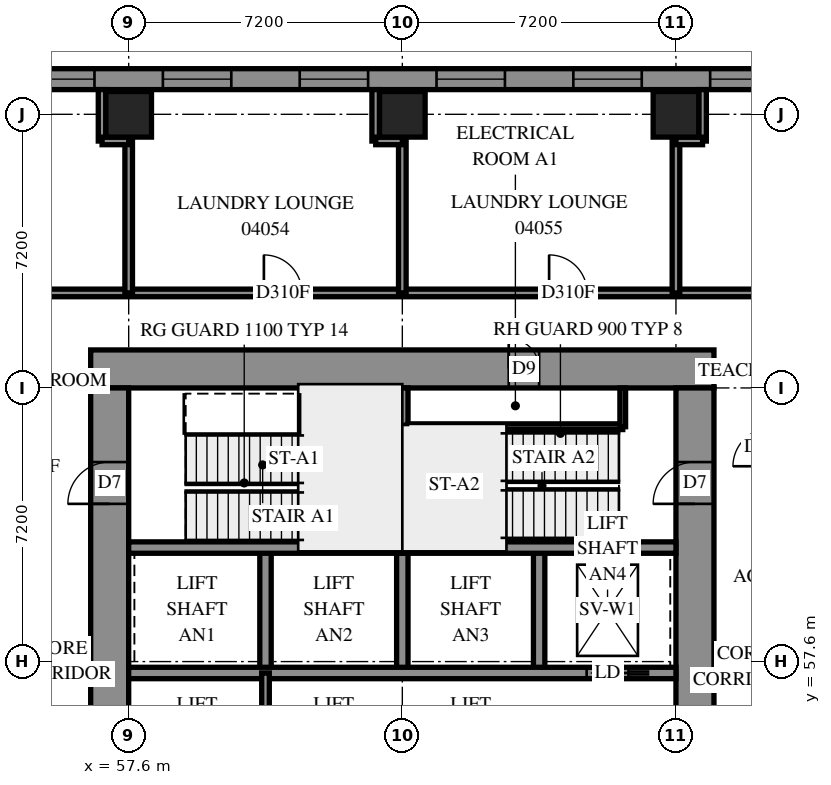
"""IFC4 building model, lengths in metres.
Left out: names, types, materials, properties, quantities, classifications, styles, units other than length and angle.
Written with IfcOpenShell. Run it as: python <this file> out.ifc"""

import sys

from ifc_helpers import new_model, si_unit, direction, frame, frame_2d, origin, origin_2d, place, context, subcontext, project, spatial, polyline, rectangle, outline, extrude, element, fill, save


model = new_model("IFC4")
c1 = context("Model", 3, precision=1e-05, world=origin(), true_north=direction((0.0, 1.0)))
c2 = subcontext(c1, "Body", "Model", "MODEL_VIEW")
j1 = project(units=[si_unit("LENGTHUNIT", "METRE"), si_unit("PLANEANGLEUNIT", "RADIAN")], contexts=[c1])
p1 = place(None, origin())
s1 = spatial("IfcSite", under=j1, at=p1, CompositionType="ELEMENT")
p2 = place(p1, origin())
s2 = spatial("IfcBuilding", under=s1, at=p2, CompositionType="ELEMENT")
p3 = place(p2, frame((0.0, 0.0, 18.6)))
s3 = spatial("IfcBuildingStorey", under=s2, at=p3, CompositionType="ELEMENT", Elevation=18.6)
for number, where, z_axis, x_axis in (
    (1, (57.6, 72.0, 0.0), (0.0, 0.0, 1.0), (1.0, 0.0, 0.0)),
    (2, (64.8, 72.0, 0.0), (0.0, 0.0, 1.0), (1.0, 0.0, 0.0)),
    (3, (72.0, 72.0, 0.0), (0.0, 0.0, 1.0), (1.0, 0.0, 0.0)),
):
    element("IfcColumn", number, at=place(p3, frame(where, z_axis=z_axis, x_axis=x_axis)), inside=s3, PredefinedType="COLUMN", context=c2, shape_type="SweptSolid", body=[
        extrude(rectangle(XDim=1.2, YDim=1.2, at=origin_2d()), origin(), (0.0, 0.0, 1.0), 3.8),
    ])
p4 = place(p3, frame((56.6, 65.3, -0.4), z_axis=(0.0, 0.0, 1.0), x_axis=(1.0, 0.0, 0.0)))
e4 = element("IfcWall", 4, at=p4, inside=s3, PredefinedType="SHEAR", context=c2, shape_type="SweptSolid", body=[
    extrude(rectangle(XDim=16.4, YDim=1.0, at=frame_2d((8.2, 0.0))), origin(), (0.0, 0.0, 1.0), 3.5),
])
p5 = place(p4, frame((11.0, 0.0, 0.4)))
e5 = element("IfcOpeningElement", 5, at=p5, cuts=e4, PredefinedType="OPENING", context=c2, shape_type="SweptSolid", body=[
    extrude(rectangle(XDim=0.8, YDim=2.1, at=frame_2d((0.4, 1.05))), frame((0.0, 0.51, 0.0), z_axis=(0.0, -1.0, 0.0), x_axis=(1.0, 0.0, 0.0)), (0.0, 0.0, 1.0), 1.02),
])
p6 = place(p3, frame((57.1, 50.4, -0.4), z_axis=(0.0, 0.0, 1.0), x_axis=(0.0, 1.0, 0.0)))
e6 = element("IfcWall", 6, at=p6, inside=s3, PredefinedType="SHEAR", context=c2, shape_type="SweptSolid", body=[
    extrude(rectangle(XDim=14.4, YDim=1.0, at=frame_2d((7.2, 0.0))), origin(), (0.0, 0.0, 1.0), 3.5),
])
p7 = place(p6, frame((4.55, 0.0, 0.4)))
e7 = element("IfcOpeningElement", 7, at=p7, cuts=e6, PredefinedType="OPENING", context=c2, shape_type="SweptSolid", body=[
    extrude(rectangle(XDim=1.1, YDim=2.1, at=frame_2d((0.55, 1.05))), frame((0.0, 0.51, 0.0), z_axis=(0.0, -1.0, 0.0), x_axis=(1.0, 0.0, 0.0)), (0.0, 0.0, 1.0), 1.02),
])
p8 = place(p6, frame((11.35, 0.0, 0.4)))
e8 = element("IfcOpeningElement", 8, at=p8, cuts=e6, PredefinedType="OPENING", context=c2, shape_type="SweptSolid", body=[
    extrude(rectangle(XDim=1.1, YDim=2.1, at=frame_2d((0.55, 1.05))), frame((0.0, 0.51, 0.0), z_axis=(0.0, -1.0, 0.0), x_axis=(1.0, 0.0, 0.0)), (0.0, 0.0, 1.0), 1.02),
])
p9 = place(p3, frame((72.5, 50.4, -0.4), z_axis=(0.0, 0.0, 1.0), x_axis=(0.0, 1.0, 0.0)))
e9 = element("IfcWall", 9, at=p9, inside=s3, PredefinedType="SHEAR", context=c2, shape_type="SweptSolid", body=[
    extrude(rectangle(XDim=14.4, YDim=1.0, at=frame_2d((7.2, 0.0))), origin(), (0.0, 0.0, 1.0), 3.5),
])
p10 = place(p9, frame((4.55, 0.0, 0.4)))
e10 = element("IfcOpeningElement", 10, at=p10, cuts=e9, PredefinedType="OPENING", context=c2, shape_type="SweptSolid", body=[
    extrude(rectangle(XDim=1.1, YDim=2.1, at=frame_2d((0.55, 1.05))), frame((0.0, 0.51, 0.0), z_axis=(0.0, -1.0, 0.0), x_axis=(1.0, 0.0, 0.0)), (0.0, 0.0, 1.0), 1.02),
])
p11 = place(p9, frame((11.35, 0.0, 0.4)))
e11 = element("IfcOpeningElement", 11, at=p11, cuts=e9, PredefinedType="OPENING", context=c2, shape_type="SweptSolid", body=[
    extrude(rectangle(XDim=1.1, YDim=2.1, at=frame_2d((0.55, 1.05))), frame((0.0, 0.51, 0.0), z_axis=(0.0, -1.0, 0.0), x_axis=(1.0, 0.0, 0.0)), (0.0, 0.0, 1.0), 1.02),
])
for number, where, z_axis, x_axis in (
    (12, (61.2, 57.3, 0.0), (0.0, 0.0, 1.0), (0.0, 1.0, 0.0)),
    (13, (64.8, 57.3, 0.0), (0.0, 0.0, 1.0), (0.0, 1.0, 0.0)),
    (14, (68.4, 57.3, 0.0), (0.0, 0.0, 1.0), (0.0, 1.0, 0.0)),
):
    element("IfcWall", number, at=place(p3, frame(where, z_axis=z_axis, x_axis=x_axis)), inside=s3, PredefinedType="SOLIDWALL", context=c2, shape_type="SweptSolid", body=[
        extrude(rectangle(XDim=3.3, YDim=0.3, at=frame_2d((1.65, 0.0))), origin(), (0.0, 0.0, 1.0), 3.8),
    ])
p12 = place(p3, frame((57.6, 57.3, 0.0), z_axis=(0.0, 0.0, 1.0), x_axis=(1.0, 0.0, 0.0)))
e15 = element("IfcWall", 15, at=p12, inside=s3, PredefinedType="SOLIDWALL", context=c2, shape_type="SweptSolid", body=[
    extrude(rectangle(XDim=14.4, YDim=0.3, at=frame_2d((7.2, 0.0))), origin(), (0.0, 0.0, 1.0), 3.8),
])
p13 = place(p12, frame((12.05, 0.0, 0.0)))
e16 = element("IfcOpeningElement", 16, at=p13, cuts=e15, PredefinedType="OPENING", context=c2, shape_type="SweptSolid", body=[
    extrude(rectangle(XDim=1.1, YDim=2.1, at=frame_2d((0.55, 1.05))), frame((0.0, 0.16, 0.0), z_axis=(0.0, -1.0, 0.0), x_axis=(1.0, 0.0, 0.0)), (0.0, 0.0, 1.0), 0.32),
])
for number, where, z_axis, x_axis in (
    (17, (57.6, 60.6, 0.0), (0.0, 0.0, 1.0), (1.0, 0.0, 0.0)),
    (18, (64.8, 60.6, 0.0), (0.0, 0.0, 1.0), (1.0, 0.0, 0.0)),
):
    element("IfcWall", number, at=place(p3, frame(where, z_axis=z_axis, x_axis=x_axis)), inside=s3, PredefinedType="SOLIDWALL", context=c2, shape_type="SweptSolid", body=[
        extrude(rectangle(XDim=7.2, YDim=0.3, at=frame_2d((3.6, 0.0))), origin(), (0.0, 0.0, 1.0), 3.8),
    ])
p14 = place(p3, frame((64.8, 60.6, 0.0), z_axis=(0.0, 0.0, 1.0), x_axis=(0.0, 1.0, 0.0)))
e19 = element("IfcWall", 19, at=p14, inside=s3, PredefinedType="SOLIDWALL", context=c2, shape_type="SweptSolid", body=[
    extrude(rectangle(XDim=4.2, YDim=0.3, at=frame_2d((2.1, 0.0))), origin(), (0.0, 0.0, 1.0), 3.8),
])
p15 = place(p3, frame((79.583, 72.925, 0.0), z_axis=(0.0, 0.0, 1.0), x_axis=(-1.0, 0.0, 0.0)))
e20 = element("IfcWall", 20, at=p15, inside=s3, PredefinedType="SOLIDWALL", context=c2, shape_type="SweptSolid", body=[
    extrude(outline(polyline([(-0.114, -0.275), (79.583, -0.275), (79.033, 0.275), (0.114, 0.275), (-0.114, -0.275)])), origin(), (0.0, 0.0, 1.0), 3.8),
])
p16 = place(p15, frame((1.249, 0.0, 0.7)))
e21 = element("IfcOpeningElement", 21, at=p16, cuts=e20, PredefinedType="OPENING", context=c2, shape_type="SweptSolid", body=[
    extrude(rectangle(XDim=1.8, YDim=2.4, at=frame_2d((0.9, 1.2))), frame((0.0, 0.285, 0.0), z_axis=(0.0, -1.0, 0.0), x_axis=(1.0, 0.0, 0.0)), (0.0, 0.0, 1.0), 0.57),
])
p17 = place(p15, frame((4.883, 0.0, 0.7)))
e22 = element("IfcOpeningElement", 22, at=p17, cuts=e20, PredefinedType="OPENING", context=c2, shape_type="SweptSolid", body=[
    extrude(rectangle(XDim=1.8, YDim=2.4, at=frame_2d((0.9, 1.2))), frame((0.0, 0.285, 0.0), z_axis=(0.0, -1.0, 0.0), x_axis=(1.0, 0.0, 0.0)), (0.0, 0.0, 1.0), 0.57),
])
p18 = place(p15, frame((8.483, 0.0, 0.7)))
e23 = element("IfcOpeningElement", 23, at=p18, cuts=e20, PredefinedType="OPENING", context=c2, shape_type="SweptSolid", body=[
    extrude(rectangle(XDim=1.8, YDim=2.4, at=frame_2d((0.9, 1.2))), frame((0.0, 0.285, 0.0), z_axis=(0.0, -1.0, 0.0), x_axis=(1.0, 0.0, 0.0)), (0.0, 0.0, 1.0), 0.57),
])
p19 = place(p15, frame((12.083, 0.0, 0.7)))
e24 = element("IfcOpeningElement", 24, at=p19, cuts=e20, PredefinedType="OPENING", context=c2, shape_type="SweptSolid", body=[
    extrude(rectangle(XDim=1.8, YDim=2.4, at=frame_2d((0.9, 1.2))), frame((0.0, 0.285, 0.0), z_axis=(0.0, -1.0, 0.0), x_axis=(1.0, 0.0, 0.0)), (0.0, 0.0, 1.0), 0.57),
])
p20 = place(p15, frame((15.683, 0.0, 0.7)))
e25 = element("IfcOpeningElement", 25, at=p20, cuts=e20, PredefinedType="OPENING", context=c2, shape_type="SweptSolid", body=[
    extrude(rectangle(XDim=1.8, YDim=2.4, at=frame_2d((0.9, 1.2))), frame((0.0, 0.285, 0.0), z_axis=(0.0, -1.0, 0.0), x_axis=(1.0, 0.0, 0.0)), (0.0, 0.0, 1.0), 0.57),
])
p21 = place(p15, frame((19.283, 0.0, 0.7)))
e26 = element("IfcOpeningElement", 26, at=p21, cuts=e20, PredefinedType="OPENING", context=c2, shape_type="SweptSolid", body=[
    extrude(rectangle(XDim=1.8, YDim=2.4, at=frame_2d((0.9, 1.2))), frame((0.0, 0.285, 0.0), z_axis=(0.0, -1.0, 0.0), x_axis=(1.0, 0.0, 0.0)), (0.0, 0.0, 1.0), 0.57),
])
p22 = place(p15, frame((22.883, 0.0, 0.7)))
e27 = element("IfcOpeningElement", 27, at=p22, cuts=e20, PredefinedType="OPENING", context=c2, shape_type="SweptSolid", body=[
    extrude(rectangle(XDim=1.8, YDim=2.4, at=frame_2d((0.9, 1.2))), frame((0.0, 0.285, 0.0), z_axis=(0.0, -1.0, 0.0), x_axis=(1.0, 0.0, 0.0)), (0.0, 0.0, 1.0), 0.57),
])
p23 = place(p15, frame((26.483, 0.0, 0.7)))
e28 = element("IfcOpeningElement", 28, at=p23, cuts=e20, PredefinedType="OPENING", context=c2, shape_type="SweptSolid", body=[
    extrude(rectangle(XDim=1.8, YDim=2.4, at=frame_2d((0.9, 1.2))), frame((0.0, 0.285, 0.0), z_axis=(0.0, -1.0, 0.0), x_axis=(1.0, 0.0, 0.0)), (0.0, 0.0, 1.0), 0.57),
])
p24 = place(p15, frame((30.083, 0.0, 0.7)))
e29 = element("IfcOpeningElement", 29, at=p24, cuts=e20, PredefinedType="OPENING", context=c2, shape_type="SweptSolid", body=[
    extrude(rectangle(XDim=1.8, YDim=2.4, at=frame_2d((0.9, 1.2))), frame((0.0, 0.285, 0.0), z_axis=(0.0, -1.0, 0.0), x_axis=(1.0, 0.0, 0.0)), (0.0, 0.0, 1.0), 0.57),
])
p25 = place(p15, frame((33.683, 0.0, 0.7)))
e30 = element("IfcOpeningElement", 30, at=p25, cuts=e20, PredefinedType="OPENING", context=c2, shape_type="SweptSolid", body=[
    extrude(rectangle(XDim=1.8, YDim=2.4, at=frame_2d((0.9, 1.2))), frame((0.0, 0.285, 0.0), z_axis=(0.0, -1.0, 0.0), x_axis=(1.0, 0.0, 0.0)), (0.0, 0.0, 1.0), 0.57),
])
p26 = place(p15, frame((37.283, 0.0, 0.7)))
e31 = element("IfcOpeningElement", 31, at=p26, cuts=e20, PredefinedType="OPENING", context=c2, shape_type="SweptSolid", body=[
    extrude(rectangle(XDim=1.8, YDim=2.4, at=frame_2d((0.9, 1.2))), frame((0.0, 0.285, 0.0), z_axis=(0.0, -1.0, 0.0), x_axis=(1.0, 0.0, 0.0)), (0.0, 0.0, 1.0), 0.57),
])
p27 = place(p15, frame((40.883, 0.0, 0.7)))
e32 = element("IfcOpeningElement", 32, at=p27, cuts=e20, PredefinedType="OPENING", context=c2, shape_type="SweptSolid", body=[
    extrude(rectangle(XDim=1.8, YDim=2.4, at=frame_2d((0.9, 1.2))), frame((0.0, 0.285, 0.0), z_axis=(0.0, -1.0, 0.0), x_axis=(1.0, 0.0, 0.0)), (0.0, 0.0, 1.0), 0.57),
])
p28 = place(p15, frame((44.483, 0.0, 0.7)))
e33 = element("IfcOpeningElement", 33, at=p28, cuts=e20, PredefinedType="OPENING", context=c2, shape_type="SweptSolid", body=[
    extrude(rectangle(XDim=1.8, YDim=2.4, at=frame_2d((0.9, 1.2))), frame((0.0, 0.285, 0.0), z_axis=(0.0, -1.0, 0.0), x_axis=(1.0, 0.0, 0.0)), (0.0, 0.0, 1.0), 0.57),
])
p29 = place(p15, frame((48.083, 0.0, 0.7)))
e34 = element("IfcOpeningElement", 34, at=p29, cuts=e20, PredefinedType="OPENING", context=c2, shape_type="SweptSolid", body=[
    extrude(rectangle(XDim=1.8, YDim=2.4, at=frame_2d((0.9, 1.2))), frame((0.0, 0.285, 0.0), z_axis=(0.0, -1.0, 0.0), x_axis=(1.0, 0.0, 0.0)), (0.0, 0.0, 1.0), 0.57),
])
p30 = place(p15, frame((51.683, 0.0, 0.7)))
e35 = element("IfcOpeningElement", 35, at=p30, cuts=e20, PredefinedType="OPENING", context=c2, shape_type="SweptSolid", body=[
    extrude(rectangle(XDim=1.8, YDim=2.4, at=frame_2d((0.9, 1.2))), frame((0.0, 0.285, 0.0), z_axis=(0.0, -1.0, 0.0), x_axis=(1.0, 0.0, 0.0)), (0.0, 0.0, 1.0), 0.57),
])
p31 = place(p15, frame((55.283, 0.0, 0.7)))
e36 = element("IfcOpeningElement", 36, at=p31, cuts=e20, PredefinedType="OPENING", context=c2, shape_type="SweptSolid", body=[
    extrude(rectangle(XDim=1.8, YDim=2.4, at=frame_2d((0.9, 1.2))), frame((0.0, 0.285, 0.0), z_axis=(0.0, -1.0, 0.0), x_axis=(1.0, 0.0, 0.0)), (0.0, 0.0, 1.0), 0.57),
])
p32 = place(p15, frame((58.883, 0.0, 0.7)))
e37 = element("IfcOpeningElement", 37, at=p32, cuts=e20, PredefinedType="OPENING", context=c2, shape_type="SweptSolid", body=[
    extrude(rectangle(XDim=1.8, YDim=2.4, at=frame_2d((0.9, 1.2))), frame((0.0, 0.285, 0.0), z_axis=(0.0, -1.0, 0.0), x_axis=(1.0, 0.0, 0.0)), (0.0, 0.0, 1.0), 0.57),
])
p33 = place(p15, frame((62.483, 0.0, 0.7)))
e38 = element("IfcOpeningElement", 38, at=p33, cuts=e20, PredefinedType="OPENING", context=c2, shape_type="SweptSolid", body=[
    extrude(rectangle(XDim=1.8, YDim=2.4, at=frame_2d((0.9, 1.2))), frame((0.0, 0.285, 0.0), z_axis=(0.0, -1.0, 0.0), x_axis=(1.0, 0.0, 0.0)), (0.0, 0.0, 1.0), 0.57),
])
p34 = place(p15, frame((66.083, 0.0, 0.7)))
e39 = element("IfcOpeningElement", 39, at=p34, cuts=e20, PredefinedType="OPENING", context=c2, shape_type="SweptSolid", body=[
    extrude(rectangle(XDim=1.8, YDim=2.4, at=frame_2d((0.9, 1.2))), frame((0.0, 0.285, 0.0), z_axis=(0.0, -1.0, 0.0), x_axis=(1.0, 0.0, 0.0)), (0.0, 0.0, 1.0), 0.57),
])
p35 = place(p15, frame((69.683, 0.0, 0.7)))
e40 = element("IfcOpeningElement", 40, at=p35, cuts=e20, PredefinedType="OPENING", context=c2, shape_type="SweptSolid", body=[
    extrude(rectangle(XDim=1.8, YDim=2.4, at=frame_2d((0.9, 1.2))), frame((0.0, 0.285, 0.0), z_axis=(0.0, -1.0, 0.0), x_axis=(1.0, 0.0, 0.0)), (0.0, 0.0, 1.0), 0.57),
])
p36 = place(p15, frame((73.683, 0.0, 0.7)))
e41 = element("IfcOpeningElement", 41, at=p36, cuts=e20, PredefinedType="OPENING", context=c2, shape_type="SweptSolid", body=[
    extrude(rectangle(XDim=1.8, YDim=2.4, at=frame_2d((0.9, 1.2))), frame((0.0, 0.285, 0.0), z_axis=(0.0, -1.0, 0.0), x_axis=(1.0, 0.0, 0.0)), (0.0, 0.0, 1.0), 0.57),
])
p37 = place(p15, frame((76.508, 0.0, 0.7)))
e42 = element("IfcOpeningElement", 42, at=p37, cuts=e20, PredefinedType="OPENING", context=c2, shape_type="SweptSolid", body=[
    extrude(rectangle(XDim=1.8, YDim=2.4, at=frame_2d((0.9, 1.2))), frame((0.0, 0.285, 0.0), z_axis=(0.0, -1.0, 0.0), x_axis=(1.0, 0.0, 0.0)), (0.0, 0.0, 1.0), 0.57),
])
p38 = place(p3, frame((64.95, 63.78, 0.0), z_axis=(0.0, 0.0, 1.0), x_axis=(1.0, 0.0, 0.0)))
e43 = element("IfcWall", 43, at=p38, inside=s3, PredefinedType="PARTITIONING", context=c2, shape_type="SweptSolid", body=[
    extrude(rectangle(XDim=5.65, YDim=0.15, at=frame_2d((2.825, 0.0))), origin(), (0.0, 0.0, 1.0), 3.8),
])
p39 = place(p3, frame((70.6, 63.78, 0.0), z_axis=(0.0, 0.0, 1.0), x_axis=(0.0, 1.0, 0.0)))
e44 = element("IfcWall", 44, at=p39, inside=s3, PredefinedType="PARTITIONING", context=c2, shape_type="SweptSolid", body=[
    extrude(rectangle(XDim=1.02, YDim=0.15, at=frame_2d((0.51, 0.0))), origin(), (0.0, 0.0, 1.0), 3.8),
])
p40 = place(p3, frame((61.2, 53.7, 0.0), z_axis=(0.0, 0.0, 1.0), x_axis=(0.0, 1.0, 0.0)))
e45 = element("IfcWall", 45, at=p40, inside=s3, PredefinedType="PARTITIONING", context=c2, shape_type="SweptSolid", body=[
    extrude(rectangle(XDim=3.6, YDim=0.2, at=frame_2d((1.8, 0.0))), origin(), (0.0, 0.0, 1.0), 3.8),
])
p41 = place(p3, frame((55.1, 67.3, 0.0), z_axis=(0.0, 0.0, 1.0), x_axis=(1.0, 0.0, 0.0)))
e46 = element("IfcWall", 46, at=p41, inside=s3, PredefinedType="PARTITIONING", context=c2, shape_type="SweptSolid", body=[
    extrude(rectangle(XDim=19.4, YDim=0.2, at=frame_2d((9.7, 0.0))), origin(), (0.0, 0.0, 1.0), 3.8),
])
p42 = place(p41, frame((6.058, 0.0, 0.0)))
e47 = element("IfcOpeningElement", 47, at=p42, cuts=e46, PredefinedType="OPENING", context=c2, shape_type="SweptSolid", body=[
    extrude(rectangle(XDim=1.0, YDim=2.1, at=frame_2d((0.5, 1.05))), frame((0.0, 0.11, 0.0), z_axis=(0.0, -1.0, 0.0), x_axis=(1.0, 0.0, 0.0)), (0.0, 0.0, 1.0), 0.22),
])
p43 = place(p41, frame((13.562, 0.0, 0.0)))
e48 = element("IfcOpeningElement", 48, at=p43, cuts=e46, PredefinedType="OPENING", context=c2, shape_type="SweptSolid", body=[
    extrude(rectangle(XDim=1.0, YDim=2.1, at=frame_2d((0.5, 1.05))), frame((0.0, 0.11, 0.0), z_axis=(0.0, -1.0, 0.0), x_axis=(1.0, 0.0, 0.0)), (0.0, 0.0, 1.0), 0.22),
])
for number, where, z_axis, x_axis in (
    (49, (57.6, 67.3, 0.0), (0.0, 0.0, 1.0), (0.0, 1.0, 0.0)),
    (50, (64.8, 67.3, 0.0), (0.0, 0.0, 1.0), (0.0, 1.0, 0.0)),
    (51, (72.0, 67.3, 0.0), (0.0, 0.0, 1.0), (0.0, 1.0, 0.0)),
):
    element("IfcWall", number, at=place(p3, frame(where, z_axis=z_axis, x_axis=x_axis)), inside=s3, PredefinedType="PARTITIONING", context=c2, shape_type="SweptSolid", body=[
        extrude(rectangle(XDim=3.996, YDim=0.2, at=frame_2d((1.998, 0.0))), origin(), (0.0, 0.0, 1.0), 3.8),
    ])
for number, where, z_axis, x_axis in (
    (52, (56.9, 71.296, 0.0), (0.0, 0.0, 1.0), (0.0, 1.0, 0.0)),
    (53, (64.1, 71.296, 0.0), (0.0, 0.0, 1.0), (0.0, 1.0, 0.0)),
    (54, (72.7, 71.296, 0.0), (0.0, 0.0, 1.0), (0.0, 1.0, 0.0)),
):
    element("IfcWall", number, at=place(p3, frame(where, z_axis=z_axis, x_axis=x_axis)), inside=s3, PredefinedType="PARTITIONING", context=c2, shape_type="SweptSolid", body=[
        extrude(rectangle(XDim=1.354, YDim=0.2, at=frame_2d((0.677, 0.0))), origin(), (0.0, 0.0, 1.0), 3.8),
    ])
for number, where, z_axis, x_axis in (
    (55, (56.9, 71.3, 0.0), (0.0, 0.0, 1.0), (1.0, 0.0, 0.0)),
    (56, (64.1, 71.3, 0.0), (0.0, 0.0, 1.0), (1.0, 0.0, 0.0)),
    (57, (72.0, 71.3, 0.0), (0.0, 0.0, 1.0), (1.0, 0.0, 0.0)),
):
    element("IfcWall", number, at=place(p3, frame(where, z_axis=z_axis, x_axis=x_axis)), inside=s3, PredefinedType="PARTITIONING", context=c2, shape_type="SweptSolid", body=[
        extrude(rectangle(XDim=0.7, YDim=0.2, at=frame_2d((0.35, 0.0))), origin(), (0.0, 0.0, 1.0), 3.8),
    ])
p44 = place(p17, origin())
e58 = element("IfcWindow", 58, at=p44, inside=s3, PartitioningType="SINGLE_PANEL", PredefinedType="WINDOW", context=c2, shape_type="SweptSolid", body=[
    extrude(rectangle(XDim=1.8, YDim=2.4, at=frame_2d((0.9, 1.2))), frame((0.0, 0.155, 0.0), z_axis=(0.0, -1.0, 0.0), x_axis=(1.0, 0.0, 0.0)), (0.0, 0.0, 1.0), 0.06),
])
fill(e22, e58)
p45 = place(p18, origin())
e59 = element("IfcWindow", 59, at=p45, inside=s3, PartitioningType="SINGLE_PANEL", PredefinedType="WINDOW", context=c2, shape_type="SweptSolid", body=[
    extrude(rectangle(XDim=1.8, YDim=2.4, at=frame_2d((0.9, 1.2))), frame((0.0, 0.155, 0.0), z_axis=(0.0, -1.0, 0.0), x_axis=(1.0, 0.0, 0.0)), (0.0, 0.0, 1.0), 0.06),
])
fill(e23, e59)
p46 = place(p19, origin())
e60 = element("IfcWindow", 60, at=p46, inside=s3, PartitioningType="SINGLE_PANEL", PredefinedType="WINDOW", context=c2, shape_type="SweptSolid", body=[
    extrude(rectangle(XDim=1.8, YDim=2.4, at=frame_2d((0.9, 1.2))), frame((0.0, 0.155, 0.0), z_axis=(0.0, -1.0, 0.0), x_axis=(1.0, 0.0, 0.0)), (0.0, 0.0, 1.0), 0.06),
])
fill(e24, e60)
p47 = place(p20, origin())
e61 = element("IfcWindow", 61, at=p47, inside=s3, PartitioningType="SINGLE_PANEL", PredefinedType="WINDOW", context=c2, shape_type="SweptSolid", body=[
    extrude(rectangle(XDim=1.8, YDim=2.4, at=frame_2d((0.9, 1.2))), frame((0.0, 0.155, 0.0), z_axis=(0.0, -1.0, 0.0), x_axis=(1.0, 0.0, 0.0)), (0.0, 0.0, 1.0), 0.06),
])
fill(e25, e61)
p48 = place(p21, origin())
e62 = element("IfcWindow", 62, at=p48, inside=s3, PartitioningType="SINGLE_PANEL", PredefinedType="WINDOW", context=c2, shape_type="SweptSolid", body=[
    extrude(rectangle(XDim=1.8, YDim=2.4, at=frame_2d((0.9, 1.2))), frame((0.0, 0.155, 0.0), z_axis=(0.0, -1.0, 0.0), x_axis=(1.0, 0.0, 0.0)), (0.0, 0.0, 1.0), 0.06),
])
fill(e26, e62)
p49 = place(p22, origin())
e63 = element("IfcWindow", 63, at=p49, inside=s3, PartitioningType="SINGLE_PANEL", PredefinedType="WINDOW", context=c2, shape_type="SweptSolid", body=[
    extrude(rectangle(XDim=1.8, YDim=2.4, at=frame_2d((0.9, 1.2))), frame((0.0, 0.155, 0.0), z_axis=(0.0, -1.0, 0.0), x_axis=(1.0, 0.0, 0.0)), (0.0, 0.0, 1.0), 0.06),
])
fill(e27, e63)
p50 = place(p5, origin())
e64 = element("IfcDoor", 64, at=p50, inside=s3, OperationType="SINGLE_SWING_RIGHT", PredefinedType="DOOR", context=c2, shape_type="SweptSolid", body=[
    extrude(rectangle(XDim=0.8, YDim=2.1, at=frame_2d((0.4, 1.05))), frame((0.0, -0.44, 0.0), z_axis=(0.0, -1.0, 0.0), x_axis=(1.0, 0.0, 0.0)), (0.0, 0.0, 1.0), 0.05),
])
fill(e5, e64)
p51 = place(p8, origin())
e65 = element("IfcDoor", 65, at=p51, inside=s3, OperationType="SINGLE_SWING_LEFT", PredefinedType="DOOR", context=c2, shape_type="SweptSolid", body=[
    extrude(rectangle(XDim=1.1, YDim=2.1, at=frame_2d((0.55, 1.05))), frame((0.0, 0.025, 0.0), z_axis=(0.0, -1.0, 0.0), x_axis=(1.0, 0.0, 0.0)), (0.0, 0.0, 1.0), 0.05),
])
fill(e8, e65)
p52 = place(p11, origin())
e66 = element("IfcDoor", 66, at=p52, inside=s3, OperationType="SINGLE_SWING_RIGHT", PredefinedType="DOOR", context=c2, shape_type="SweptSolid", body=[
    extrude(rectangle(XDim=1.1, YDim=2.1, at=frame_2d((0.55, 1.05))), frame((0.0, 0.025, 0.0), z_axis=(0.0, -1.0, 0.0), x_axis=(1.0, 0.0, 0.0)), (0.0, 0.0, 1.0), 0.05),
])
fill(e11, e66)
p53 = place(p13, origin())
e67 = element("IfcDoor", 67, at=p53, inside=s3, OperationType="SLIDING_TO_RIGHT", PredefinedType="DOOR", context=c2, shape_type="SweptSolid", body=[
    extrude(rectangle(XDim=1.1, YDim=2.1, at=frame_2d((0.55, 1.05))), frame((0.0, 0.025, 0.0), z_axis=(0.0, -1.0, 0.0), x_axis=(1.0, 0.0, 0.0)), (0.0, 0.0, 1.0), 0.05),
])
fill(e16, e67)
p54 = place(p42, origin())
e68 = element("IfcDoor", 68, at=p54, inside=s3, OperationType="SINGLE_SWING_RIGHT", PredefinedType="DOOR", context=c2, shape_type="SweptSolid", body=[
    extrude(rectangle(XDim=1.0, YDim=2.1, at=frame_2d((0.5, 1.05))), frame((0.0, 0.025, 0.0), z_axis=(0.0, -1.0, 0.0), x_axis=(1.0, 0.0, 0.0)), (0.0, 0.0, 1.0), 0.05),
])
fill(e47, e68)
p55 = place(p43, origin())
e69 = element("IfcDoor", 69, at=p55, inside=s3, OperationType="SINGLE_SWING_RIGHT", PredefinedType="DOOR", context=c2, shape_type="SweptSolid", body=[
    extrude(rectangle(XDim=1.0, YDim=2.1, at=frame_2d((0.5, 1.05))), frame((0.0, 0.025, 0.0), z_axis=(0.0, -1.0, 0.0), x_axis=(1.0, 0.0, 0.0)), (0.0, 0.0, 1.0), 0.05),
])
fill(e48, e69)
save(model, sys.argv[1])
